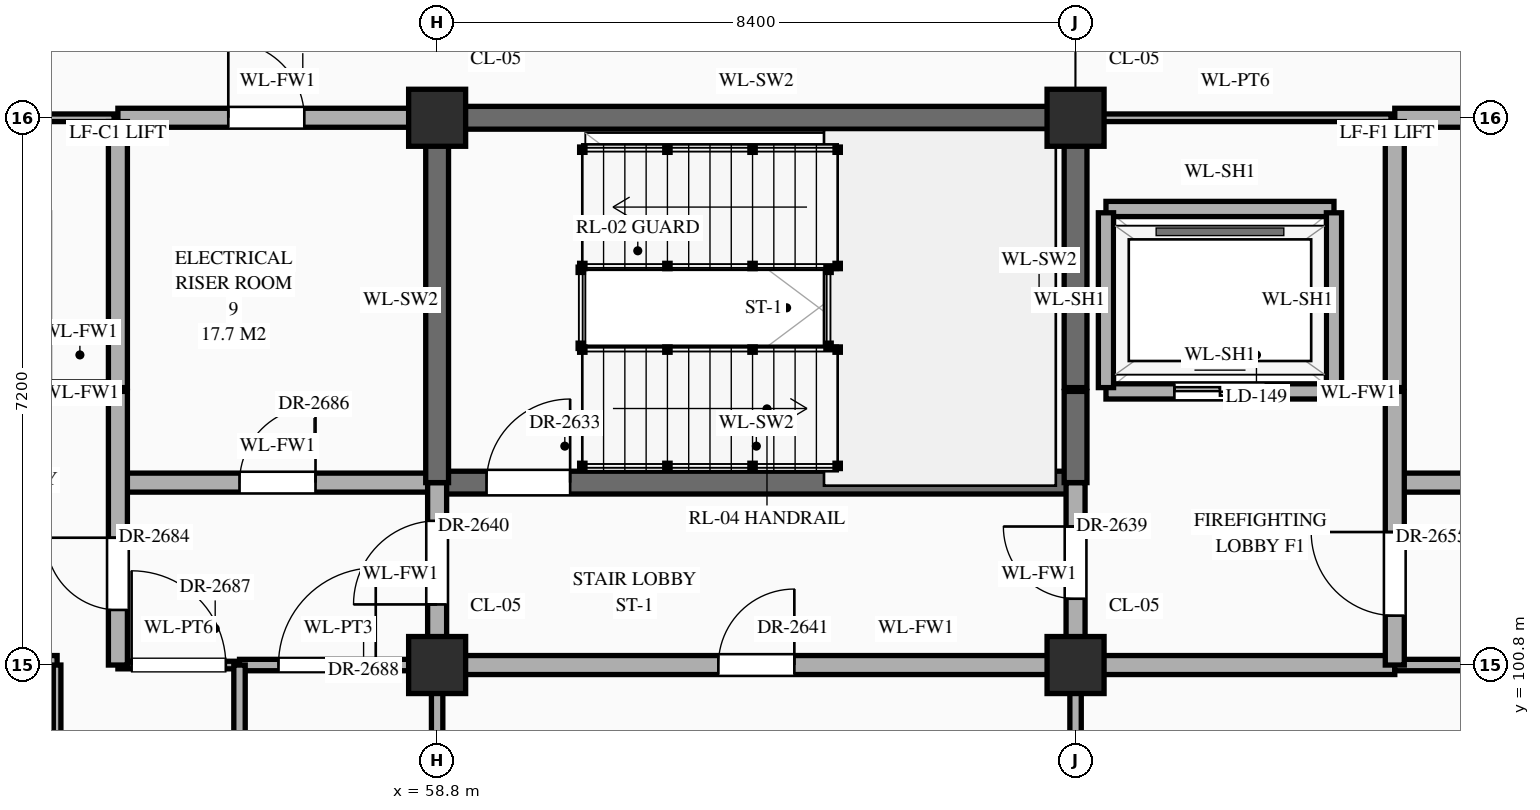
"""IFC4 building model, lengths in metres.
Left out: names, types, materials, properties, quantities, classifications, styles, units other than length and angle.
Written with IfcOpenShell. Run it as: python <this file> out.ifc"""

import sys

from ifc_helpers import new_model, si_unit, direction, frame, frame_2d, origin, origin_2d, place, context, subcontext, project, spatial, rectangle, extrude, element, fill, save


model = new_model("IFC4")
c1 = context("Model", 3, precision=1e-05, world=origin(), true_north=direction((0.0, 1.0)))
c2 = subcontext(c1, "Body", "Model", "MODEL_VIEW")
j1 = project(units=[si_unit("LENGTHUNIT", "METRE"), si_unit("PLANEANGLEUNIT", "RADIAN")], contexts=[c1])
p1 = place(None, origin())
s1 = spatial("IfcSite", under=j1, at=p1, CompositionType="ELEMENT")
p2 = place(p1, origin())
s2 = spatial("IfcBuilding", under=s1, at=p2, CompositionType="ELEMENT")
p3 = place(p2, frame((0.0, 0.0, 39.3)))
s3 = spatial("IfcBuildingStorey", under=s2, at=p3, CompositionType="ELEMENT", Elevation=39.3)
for number, where, z_axis, x_axis in (
    (1, (58.8, 100.8, 0.0), (0.0, 0.0, 1.0), (1.0, 0.0, 0.0)),
    (2, (58.8, 108.0, 0.0), (0.0, 0.0, 1.0), (1.0, 0.0, 0.0)),
    (3, (67.2, 100.8, 0.0), (0.0, 0.0, 1.0), (1.0, 0.0, 0.0)),
    (4, (67.2, 108.0, 0.0), (0.0, 0.0, 1.0), (1.0, 0.0, 0.0)),
):
    element("IfcColumn", number, at=place(p3, frame(where, z_axis=z_axis, x_axis=x_axis)), inside=s3, PredefinedType="COLUMN", context=c2, shape_type="SweptSolid", body=[
        extrude(rectangle(XDim=0.75, YDim=0.75, at=origin_2d()), origin(), (0.0, 0.0, 1.0), 4.2),
    ])
p4 = place(p3, frame((50.4, 100.8, 0.0), z_axis=(0.0, 0.0, 1.0), x_axis=(1.0, 0.0, 0.0)))
e5 = element("IfcWall", 5, at=p4, inside=s3, PredefinedType="STANDARD", context=c2, shape_type="SweptSolid", body=[
    extrude(rectangle(XDim=3.4, YDim=0.25, at=frame_2d((1.7, 0.0))), origin(), (0.0, 0.0, 1.0), 3.1),
])
p5 = place(p4, frame((1.298, 0.0, 0.0)))
e6 = element("IfcOpeningElement", 6, at=p5, cuts=e5, PredefinedType="OPENING", context=c2, shape_type="SweptSolid", body=[
    extrude(rectangle(XDim=1.1, YDim=2.2, at=frame_2d((0.55, 1.1))), frame((0.0, 0.137, 0.0), z_axis=(0.0, -1.0, 0.0), x_axis=(1.0, 0.0, 0.0)), (0.0, 0.0, 1.0), 0.274),
])
p6 = place(p3, frame((54.6, 100.8, 0.0), z_axis=(0.0, 0.0, 1.0), x_axis=(1.0, 0.0, 0.0)))
e7 = element("IfcWall", 7, at=p6, inside=s3, PredefinedType="STANDARD", context=c2, shape_type="SweptSolid", body=[
    extrude(rectangle(XDim=1.6, YDim=0.1, at=frame_2d((0.8, 0.0))), origin(), (0.0, 0.0, 1.0), 3.1),
])
p7 = place(p6, frame((0.18, 0.0, 0.0)))
e8 = element("IfcOpeningElement", 8, at=p7, cuts=e7, PredefinedType="OPENING", context=c2, shape_type="SweptSolid", body=[
    extrude(rectangle(XDim=1.24, YDim=2.3, at=frame_2d((0.62, 1.15))), frame((0.0, 0.062, 0.0), z_axis=(0.0, -1.0, 0.0), x_axis=(1.0, 0.0, 0.0)), (0.0, 0.0, 1.0), 0.124),
])
p8 = place(p3, frame((56.2, 100.8, 0.0), z_axis=(0.0, 0.0, 1.0), x_axis=(1.0, 0.0, 0.0)))
e9 = element("IfcWall", 9, at=p8, inside=s3, PredefinedType="STANDARD", context=c2, shape_type="SweptSolid", body=[
    extrude(rectangle(XDim=2.6, YDim=0.15, at=frame_2d((1.3, 0.0))), origin(), (0.0, 0.0, 1.0), 3.1),
])
p9 = place(p8, frame((0.512, 0.0, 0.0)))
e10 = element("IfcOpeningElement", 10, at=p9, cuts=e9, PredefinedType="OPENING", context=c2, shape_type="SweptSolid", body=[
    extrude(rectangle(XDim=1.28, YDim=2.35, at=frame_2d((0.64, 1.175))), frame((0.0, 0.087, 0.0), z_axis=(0.0, -1.0, 0.0), x_axis=(1.0, 0.0, 0.0)), (0.0, 0.0, 1.0), 0.174),
])
p10 = place(p3, frame((58.8, 100.8, 0.0), z_axis=(0.0, 0.0, 1.0), x_axis=(1.0, 0.0, 0.0)))
e11 = element("IfcWall", 11, at=p10, inside=s3, PredefinedType="STANDARD", context=c2, shape_type="SweptSolid", body=[
    extrude(rectangle(XDim=12.6, YDim=0.25, at=frame_2d((6.3, 0.0))), origin(), (0.0, 0.0, 1.0), 3.1),
])
p11 = place(p10, frame((3.7, 0.0, 0.0)))
e12 = element("IfcOpeningElement", 12, at=p11, cuts=e11, PredefinedType="OPENING", context=c2, shape_type="SweptSolid", body=[
    extrude(rectangle(XDim=1.0, YDim=2.2, at=frame_2d((0.5, 1.1))), frame((0.0, 0.137, 0.0), z_axis=(0.0, -1.0, 0.0), x_axis=(1.0, 0.0, 0.0)), (0.0, 0.0, 1.0), 0.274),
])
p12 = place(p3, frame((71.4, 100.8, 0.0), z_axis=(0.0, 0.0, 1.0), x_axis=(1.0, 0.0, 0.0)))
e13 = element("IfcWall", 13, at=p12, inside=s3, PredefinedType="STANDARD", context=c2, shape_type="SweptSolid", body=[
    extrude(rectangle(XDim=4.2, YDim=0.15, at=frame_2d((2.1, 0.0))), origin(), (0.0, 0.0, 1.0), 3.1),
])
p13 = place(p12, frame((1.423, 0.0, 0.0)))
e14 = element("IfcOpeningElement", 14, at=p13, cuts=e13, PredefinedType="OPENING", context=c2, shape_type="SweptSolid", body=[
    extrude(rectangle(XDim=1.06, YDim=2.4, at=frame_2d((0.53, 1.2))), frame((0.0, 0.087, 0.0), z_axis=(0.0, -1.0, 0.0), x_axis=(1.0, 0.0, 0.0)), (0.0, 0.0, 1.0), 0.174),
])
p14 = place(p3, frame((54.6, 103.2, 0.0), z_axis=(0.0, 0.0, 1.0), x_axis=(1.0, 0.0, 0.0)))
e15 = element("IfcWall", 15, at=p14, inside=s3, PredefinedType="STANDARD", context=c2, shape_type="SweptSolid", body=[
    extrude(rectangle(XDim=4.2, YDim=0.25, at=frame_2d((2.1, 0.0))), origin(), (0.0, 0.0, 1.0), 3.95),
])
p15 = place(p14, frame((1.6, 0.0, 0.0)))
e16 = element("IfcOpeningElement", 16, at=p15, cuts=e15, PredefinedType="OPENING", context=c2, shape_type="SweptSolid", body=[
    extrude(rectangle(XDim=1.0, YDim=2.2, at=frame_2d((0.5, 1.1))), frame((0.0, 0.137, 0.0), z_axis=(0.0, -1.0, 0.0), x_axis=(1.0, 0.0, 0.0)), (0.0, 0.0, 1.0), 0.274),
])
p16 = place(p3, frame((58.8, 103.2, 0.0), z_axis=(0.0, 0.0, 1.0), x_axis=(1.0, 0.0, 0.0)))
e17 = element("IfcWall", 17, at=p16, inside=s3, PredefinedType="SHEAR", context=c2, shape_type="SweptSolid", body=[
    extrude(rectangle(XDim=8.4, YDim=0.3, at=frame_2d((4.2, 0.0))), origin(), (0.0, 0.0, 1.0), 3.95),
])
p17 = place(p16, frame((0.65, 0.0, 0.0)))
e18 = element("IfcOpeningElement", 18, at=p17, cuts=e17, PredefinedType="OPENING", context=c2, shape_type="SweptSolid", body=[
    extrude(rectangle(XDim=1.1, YDim=2.2, at=frame_2d((0.55, 1.1))), frame((0.0, 0.162, 0.0), z_axis=(0.0, -1.0, 0.0), x_axis=(1.0, 0.0, 0.0)), (0.0, 0.0, 1.0), 0.324),
])
p18 = place(p3, frame((71.4, 103.2, 0.0), z_axis=(0.0, 0.0, 1.0), x_axis=(1.0, 0.0, 0.0)))
e19 = element("IfcWall", 19, at=p18, inside=s3, PredefinedType="STANDARD", context=c2, shape_type="SweptSolid", body=[
    extrude(rectangle(XDim=4.2, YDim=0.25, at=frame_2d((2.1, 0.0))), origin(), (0.0, 0.0, 1.0), 3.95),
])
p19 = place(p18, frame((1.6, 0.0, 0.0)))
e20 = element("IfcOpeningElement", 20, at=p19, cuts=e19, PredefinedType="OPENING", context=c2, shape_type="SweptSolid", body=[
    extrude(rectangle(XDim=1.0, YDim=2.2, at=frame_2d((0.5, 1.1))), frame((0.0, 0.137, 0.0), z_axis=(0.0, -1.0, 0.0), x_axis=(1.0, 0.0, 0.0)), (0.0, 0.0, 1.0), 0.274),
])
p20 = place(p3, frame((53.65, 104.4, 0.0), z_axis=(0.0, 0.0, 1.0), x_axis=(1.0, 0.0, 0.0)))
e21 = element("IfcWall", 21, at=p20, inside=s3, PredefinedType="STANDARD", context=c2, shape_type="SweptSolid", body=[
    extrude(rectangle(XDim=0.9, YDim=0.25, at=frame_2d((0.45, 0.0))), origin(), (0.0, 0.0, 1.0), 3.95),
])
p21 = place(p3, frame((67.6, 104.4, 0.0), z_axis=(0.0, 0.0, 1.0), x_axis=(1.0, 0.0, 0.0)))
e22 = element("IfcWall", 22, at=p21, inside=s3, PredefinedType="STANDARD", context=c2, shape_type="SweptSolid", body=[
    extrude(rectangle(XDim=3.0, YDim=0.2, at=frame_2d((1.5, 0.0))), origin(), (0.0, 0.0, 1.0), 3.95),
])
p22 = place(p21, frame((0.9, 0.0, 0.0)))
e23 = element("IfcOpeningElement", 23, at=p22, cuts=e22, PredefinedType="OPENING", context=c2, shape_type="SweptSolid", body=[
    extrude(rectangle(XDim=1.2, YDim=2.15, at=frame_2d((0.6, 1.075))), frame((0.0, 0.112, 0.0), z_axis=(0.0, -1.0, 0.0), x_axis=(1.0, 0.0, 0.0)), (0.0, 0.0, 1.0), 0.224),
])
p23 = place(p3, frame((67.6, 106.8, 0.0), z_axis=(0.0, 0.0, 1.0), x_axis=(1.0, 0.0, 0.0)))
e24 = element("IfcWall", 24, at=p23, inside=s3, PredefinedType="STANDARD", context=c2, shape_type="SweptSolid", body=[
    extrude(rectangle(XDim=3.0, YDim=0.2, at=frame_2d((1.5, 0.0))), origin(), (0.0, 0.0, 1.0), 3.95),
])
p24 = place(p3, frame((50.45, 108.0, 0.0), z_axis=(0.0, 0.0, 1.0), x_axis=(1.0, 0.0, 0.0)))
e25 = element("IfcWall", 25, at=p24, inside=s3, PredefinedType="STANDARD", context=c2, shape_type="SweptSolid", body=[
    extrude(rectangle(XDim=4.1, YDim=0.1, at=frame_2d((2.05, 0.0))), origin(), (0.0, 0.0, 1.0), 3.1),
])
p25 = place(p3, frame((54.6, 108.0, 0.0), z_axis=(0.0, 0.0, 1.0), x_axis=(1.0, 0.0, 0.0)))
e26 = element("IfcWall", 26, at=p25, inside=s3, PredefinedType="STANDARD", context=c2, shape_type="SweptSolid", body=[
    extrude(rectangle(XDim=4.2, YDim=0.25, at=frame_2d((2.1, 0.0))), origin(), (0.0, 0.0, 1.0), 3.1),
])
p26 = place(p25, frame((1.452, 0.0, 0.0)))
e27 = element("IfcOpeningElement", 27, at=p26, cuts=e26, PredefinedType="OPENING", context=c2, shape_type="SweptSolid", body=[
    extrude(rectangle(XDim=1.0, YDim=2.2, at=frame_2d((0.5, 1.1))), frame((0.0, 0.137, 0.0), z_axis=(0.0, -1.0, 0.0), x_axis=(1.0, 0.0, 0.0)), (0.0, 0.0, 1.0), 0.274),
])
p27 = place(p3, frame((58.8, 108.0, 0.0), z_axis=(0.0, 0.0, 1.0), x_axis=(1.0, 0.0, 0.0)))
e28 = element("IfcWall", 28, at=p27, inside=s3, PredefinedType="SHEAR", context=c2, shape_type="SweptSolid", body=[
    extrude(rectangle(XDim=8.4, YDim=0.3, at=frame_2d((4.2, 0.0))), origin(), (0.0, 0.0, 1.0), 3.95),
])
p28 = place(p3, frame((67.25, 108.0, 0.0), z_axis=(0.0, 0.0, 1.0), x_axis=(1.0, 0.0, 0.0)))
e29 = element("IfcWall", 29, at=p28, inside=s3, PredefinedType="STANDARD", context=c2, shape_type="SweptSolid", body=[
    extrude(rectangle(XDim=4.1, YDim=0.1, at=frame_2d((2.05, 0.0))), origin(), (0.0, 0.0, 1.0), 3.1),
])
p29 = place(p3, frame((71.4, 108.0, 0.0), z_axis=(0.0, 0.0, 1.0), x_axis=(1.0, 0.0, 0.0)))
e30 = element("IfcWall", 30, at=p29, inside=s3, PredefinedType="STANDARD", context=c2, shape_type="SweptSolid", body=[
    extrude(rectangle(XDim=4.2, YDim=0.25, at=frame_2d((2.1, 0.0))), origin(), (0.0, 0.0, 1.0), 3.1),
])
p30 = place(p29, frame((1.452, 0.0, 0.0)))
e31 = element("IfcOpeningElement", 31, at=p30, cuts=e30, PredefinedType="OPENING", context=c2, shape_type="SweptSolid", body=[
    extrude(rectangle(XDim=1.0, YDim=2.2, at=frame_2d((0.5, 1.1))), frame((0.0, 0.137, 0.0), z_axis=(0.0, -1.0, 0.0), x_axis=(1.0, 0.0, 0.0)), (0.0, 0.0, 1.0), 0.274),
])
p31 = place(p3, frame((53.8, 96.0, 0.0), z_axis=(0.0, 0.0, 1.0), x_axis=(0.0, 1.0, 0.0)))
e32 = element("IfcWall", 32, at=p31, inside=s3, PredefinedType="STANDARD", context=c2, shape_type="SweptSolid", body=[
    extrude(rectangle(XDim=4.8, YDim=0.1, at=frame_2d((2.4, 0.0))), origin(), (0.0, 0.0, 1.0), 3.95),
])
p32 = place(p31, frame((1.97, 0.0, 0.0)))
e33 = element("IfcOpeningElement", 33, at=p32, cuts=e32, PredefinedType="OPENING", context=c2, shape_type="SweptSolid", body=[
    extrude(rectangle(XDim=0.86, YDim=2.1, at=frame_2d((0.43, 1.05))), frame((0.0, 0.062, 0.0), z_axis=(0.0, -1.0, 0.0), x_axis=(1.0, 0.0, 0.0)), (0.0, 0.0, 1.0), 0.124),
])
p33 = place(p3, frame((54.6, 100.8, 0.0), z_axis=(0.0, 0.0, 1.0), x_axis=(0.0, 1.0, 0.0)))
e34 = element("IfcWall", 34, at=p33, inside=s3, PredefinedType="STANDARD", context=c2, shape_type="SweptSolid", body=[
    extrude(rectangle(XDim=3.6, YDim=0.25, at=frame_2d((1.8, 0.0))), origin(), (0.0, 0.0, 1.0), 3.65),
])
p34 = place(p33, frame((0.725, 0.0, 0.0)))
e35 = element("IfcOpeningElement", 35, at=p34, cuts=e34, PredefinedType="OPENING", context=c2, shape_type="SweptSolid", body=[
    extrude(rectangle(XDim=0.95, YDim=2.15, at=frame_2d((0.475, 1.075))), frame((0.0, 0.137, 0.0), z_axis=(0.0, -1.0, 0.0), x_axis=(1.0, 0.0, 0.0)), (0.0, 0.0, 1.0), 0.274),
])
p35 = place(p3, frame((54.6, 104.45, 0.0), z_axis=(0.0, 0.0, 1.0), x_axis=(0.0, 1.0, 0.0)))
e36 = element("IfcWall", 36, at=p35, inside=s3, PredefinedType="STANDARD", context=c2, shape_type="SweptSolid", body=[
    extrude(rectangle(XDim=3.5, YDim=0.25, at=frame_2d((1.75, 0.0))), origin(), (0.0, 0.0, 1.0), 3.65),
])
p36 = place(p3, frame((56.2, 96.0, 0.0), z_axis=(0.0, 0.0, 1.0), x_axis=(0.0, 1.0, 0.0)))
e37 = element("IfcWall", 37, at=p36, inside=s3, PredefinedType="STANDARD", context=c2, shape_type="SweptSolid", body=[
    extrude(rectangle(XDim=4.8, YDim=0.15, at=frame_2d((2.4, 0.0))), origin(), (0.0, 0.0, 1.0), 3.95),
])
p37 = place(p36, frame((1.94, 0.0, 0.0)))
e38 = element("IfcOpeningElement", 38, at=p37, cuts=e37, PredefinedType="OPENING", context=c2, shape_type="SweptSolid", body=[
    extrude(rectangle(XDim=0.92, YDim=2.15, at=frame_2d((0.46, 1.075))), frame((0.0, 0.087, 0.0), z_axis=(0.0, -1.0, 0.0), x_axis=(1.0, 0.0, 0.0)), (0.0, 0.0, 1.0), 0.174),
])
p38 = place(p3, frame((58.8, 96.0, 0.0), z_axis=(0.0, 0.0, 1.0), x_axis=(0.0, 1.0, 0.0)))
e39 = element("IfcWall", 39, at=p38, inside=s3, PredefinedType="STANDARD", context=c2, shape_type="SweptSolid", body=[
    extrude(rectangle(XDim=4.8, YDim=0.15, at=frame_2d((2.4, 0.0))), origin(), (0.0, 0.0, 1.0), 3.2),
])
p39 = place(p3, frame((58.8, 100.8, 0.0), z_axis=(0.0, 0.0, 1.0), x_axis=(0.0, 1.0, 0.0)))
e40 = element("IfcWall", 40, at=p39, inside=s3, PredefinedType="STANDARD", context=c2, shape_type="SweptSolid", body=[
    extrude(rectangle(XDim=2.4, YDim=0.25, at=frame_2d((1.2, 0.0))), origin(), (0.0, 0.0, 1.0), 3.2),
])
p40 = place(p39, frame((0.798, 0.0, 0.0)))
e41 = element("IfcOpeningElement", 41, at=p40, cuts=e40, PredefinedType="OPENING", context=c2, shape_type="SweptSolid", body=[
    extrude(rectangle(XDim=1.1, YDim=2.2, at=frame_2d((0.55, 1.1))), frame((0.0, 0.137, 0.0), z_axis=(0.0, -1.0, 0.0), x_axis=(1.0, 0.0, 0.0)), (0.0, 0.0, 1.0), 0.274),
])
p41 = place(p3, frame((58.8, 103.2, 0.0), z_axis=(0.0, 0.0, 1.0), x_axis=(0.0, 1.0, 0.0)))
e42 = element("IfcWall", 42, at=p41, inside=s3, PredefinedType="SHEAR", context=c2, shape_type="SweptSolid", body=[
    extrude(rectangle(XDim=4.8, YDim=0.3, at=frame_2d((2.4, 0.0))), origin(), (0.0, 0.0, 1.0), 3.95),
])
p42 = place(p3, frame((67.2, 96.0, 0.0), z_axis=(0.0, 0.0, 1.0), x_axis=(0.0, 1.0, 0.0)))
e43 = element("IfcWall", 43, at=p42, inside=s3, PredefinedType="STANDARD", context=c2, shape_type="SweptSolid", body=[
    extrude(rectangle(XDim=4.8, YDim=0.15, at=frame_2d((2.4, 0.0))), origin(), (0.0, 0.0, 1.0), 3.2),
])
p43 = place(p3, frame((67.2, 100.8, 0.0), z_axis=(0.0, 0.0, 1.0), x_axis=(0.0, 1.0, 0.0)))
e44 = element("IfcWall", 44, at=p43, inside=s3, PredefinedType="STANDARD", context=c2, shape_type="SweptSolid", body=[
    extrude(rectangle(XDim=2.4, YDim=0.25, at=frame_2d((1.2, 0.0))), origin(), (0.0, 0.0, 1.0), 3.2),
])
p44 = place(p43, frame((0.873, 0.0, 0.0)))
e45 = element("IfcOpeningElement", 45, at=p44, cuts=e44, PredefinedType="OPENING", context=c2, shape_type="SweptSolid", body=[
    extrude(rectangle(XDim=0.95, YDim=2.15, at=frame_2d((0.475, 1.075))), frame((0.0, 0.137, 0.0), z_axis=(0.0, -1.0, 0.0), x_axis=(1.0, 0.0, 0.0)), (0.0, 0.0, 1.0), 0.274),
])
p45 = place(p3, frame((67.2, 103.2, 0.0), z_axis=(0.0, 0.0, 1.0), x_axis=(0.0, 1.0, 0.0)))
e46 = element("IfcWall", 46, at=p45, inside=s3, PredefinedType="SHEAR", context=c2, shape_type="SweptSolid", body=[
    extrude(rectangle(XDim=1.2, YDim=0.3, at=frame_2d((0.6, 0.0))), origin(), (0.0, 0.0, 1.0), 3.95),
])
p46 = place(p3, frame((67.2, 104.45, 0.0), z_axis=(0.0, 0.0, 1.0), x_axis=(0.0, 1.0, 0.0)))
e47 = element("IfcWall", 47, at=p46, inside=s3, PredefinedType="SHEAR", context=c2, shape_type="SweptSolid", body=[
    extrude(rectangle(XDim=3.5, YDim=0.3, at=frame_2d((1.75, 0.0))), origin(), (0.0, 0.0, 1.0), 3.95),
])
for number, where, z_axis, x_axis in (
    (48, (67.6, 104.45, 0.0), (0.0, 0.0, 1.0), (0.0, 1.0, 0.0)),
    (49, (70.6, 104.45, 0.0), (0.0, 0.0, 1.0), (0.0, 1.0, 0.0)),
):
    element("IfcWall", number, at=place(p3, frame(where, z_axis=z_axis, x_axis=x_axis)), inside=s3, PredefinedType="STANDARD", context=c2, shape_type="SweptSolid", body=[
        extrude(rectangle(XDim=2.3, YDim=0.2, at=frame_2d((1.15, 0.0))), origin(), (0.0, 0.0, 1.0), 3.95),
    ])
p47 = place(p3, frame((71.4, 100.8, 0.0), z_axis=(0.0, 0.0, 1.0), x_axis=(0.0, 1.0, 0.0)))
e50 = element("IfcWall", 50, at=p47, inside=s3, PredefinedType="STANDARD", context=c2, shape_type="SweptSolid", body=[
    extrude(rectangle(XDim=3.6, YDim=0.25, at=frame_2d((1.8, 0.0))), origin(), (0.0, 0.0, 1.0), 3.6),
])
p48 = place(p47, frame((0.65, 0.0, 0.0)))
e51 = element("IfcOpeningElement", 51, at=p48, cuts=e50, PredefinedType="OPENING", context=c2, shape_type="SweptSolid", body=[
    extrude(rectangle(XDim=1.1, YDim=2.2, at=frame_2d((0.55, 1.1))), frame((0.0, 0.137, 0.0), z_axis=(0.0, -1.0, 0.0), x_axis=(1.0, 0.0, 0.0)), (0.0, 0.0, 1.0), 0.274),
])
p49 = place(p3, frame((71.4, 104.45, 0.0), z_axis=(0.0, 0.0, 1.0), x_axis=(0.0, 1.0, 0.0)))
e52 = element("IfcWall", 52, at=p49, inside=s3, PredefinedType="STANDARD", context=c2, shape_type="SweptSolid", body=[
    extrude(rectangle(XDim=3.5, YDim=0.25, at=frame_2d((1.75, 0.0))), origin(), (0.0, 0.0, 1.0), 3.6),
])
p50 = place(p22, origin())
e53 = element("IfcDoor", 53, at=p50, inside=s3, OperationType="DOUBLE_DOOR_SLIDING", PredefinedType="DOOR", context=c2, shape_type="SweptSolid", body=[
    extrude(rectangle(XDim=1.2, YDim=2.15, at=frame_2d((0.6, 1.075))), frame((0.0, 0.025, 0.0), z_axis=(0.0, -1.0, 0.0), x_axis=(1.0, 0.0, 0.0)), (0.0, 0.0, 1.0), 0.05),
])
fill(e23, e53)
p51 = place(p17, origin())
e54 = element("IfcDoor", 54, at=p51, inside=s3, OperationType="SINGLE_SWING_RIGHT", PredefinedType="DOOR", context=c2, shape_type="SweptSolid", body=[
    extrude(rectangle(XDim=1.1, YDim=2.2, at=frame_2d((0.55, 1.1))), frame((0.0, 0.025, 0.0), z_axis=(0.0, -1.0, 0.0), x_axis=(1.0, 0.0, 0.0)), (0.0, 0.0, 1.0), 0.05),
])
fill(e18, e54)
p52 = place(p44, origin())
e55 = element("IfcDoor", 55, at=p52, inside=s3, OperationType="SINGLE_SWING_RIGHT", PredefinedType="DOOR", context=c2, shape_type="SweptSolid", body=[
    extrude(rectangle(XDim=0.95, YDim=2.15, at=frame_2d((0.475, 1.075))), frame((0.0, 0.025, 0.0), z_axis=(0.0, -1.0, 0.0), x_axis=(1.0, 0.0, 0.0)), (0.0, 0.0, 1.0), 0.05),
])
fill(e45, e55)
p53 = place(p40, origin())
e56 = element("IfcDoor", 56, at=p53, inside=s3, OperationType="SINGLE_SWING_LEFT", PredefinedType="DOOR", context=c2, shape_type="SweptSolid", body=[
    extrude(rectangle(XDim=1.1, YDim=2.2, at=frame_2d((0.55, 1.1))), frame((0.0, 0.025, 0.0), z_axis=(0.0, -1.0, 0.0), x_axis=(1.0, 0.0, 0.0)), (0.0, 0.0, 1.0), 0.05),
])
fill(e41, e56)
p54 = place(p11, origin())
e57 = element("IfcDoor", 57, at=p54, inside=s3, OperationType="SINGLE_SWING_RIGHT", PredefinedType="DOOR", context=c2, shape_type="SweptSolid", body=[
    extrude(rectangle(XDim=1.0, YDim=2.2, at=frame_2d((0.5, 1.1))), frame((0.0, 0.025, 0.0), z_axis=(0.0, -1.0, 0.0), x_axis=(1.0, 0.0, 0.0)), (0.0, 0.0, 1.0), 0.05),
])
fill(e12, e57)
p55 = place(p48, origin())
e58 = element("IfcDoor", 58, at=p55, inside=s3, OperationType="SINGLE_SWING_RIGHT", PredefinedType="DOOR", context=c2, shape_type="SweptSolid", body=[
    extrude(rectangle(XDim=1.1, YDim=2.2, at=frame_2d((0.55, 1.1))), frame((0.0, 0.025, 0.0), z_axis=(0.0, -1.0, 0.0), x_axis=(1.0, 0.0, 0.0)), (0.0, 0.0, 1.0), 0.05),
])
fill(e51, e58)
p56 = place(p34, origin())
e59 = element("IfcDoor", 59, at=p56, inside=s3, OperationType="SINGLE_SWING_RIGHT", PredefinedType="DOOR", context=c2, shape_type="SweptSolid", body=[
    extrude(rectangle(XDim=0.95, YDim=2.15, at=frame_2d((0.475, 1.075))), frame((0.0, 0.025, 0.0), z_axis=(0.0, -1.0, 0.0), x_axis=(1.0, 0.0, 0.0)), (0.0, 0.0, 1.0), 0.05),
])
fill(e35, e59)
p57 = place(p15, origin())
e60 = element("IfcDoor", 60, at=p57, inside=s3, OperationType="SINGLE_SWING_RIGHT", PredefinedType="DOOR", context=c2, shape_type="SweptSolid", body=[
    extrude(rectangle(XDim=1.0, YDim=2.2, at=frame_2d((0.5, 1.1))), frame((0.0, 0.025, 0.0), z_axis=(0.0, -1.0, 0.0), x_axis=(1.0, 0.0, 0.0)), (0.0, 0.0, 1.0), 0.05),
])
fill(e16, e60)
p58 = place(p7, origin())
e61 = element("IfcDoor", 61, at=p58, inside=s3, OperationType="SINGLE_SWING_LEFT", PredefinedType="DOOR", context=c2, shape_type="SweptSolid", body=[
    extrude(rectangle(XDim=1.24, YDim=2.3, at=frame_2d((0.62, 1.15))), frame((0.0, 0.025, 0.0), z_axis=(0.0, -1.0, 0.0), x_axis=(1.0, 0.0, 0.0)), (0.0, 0.0, 1.0), 0.05),
])
fill(e8, e61)
p59 = place(p9, origin())
e62 = element("IfcDoor", 62, at=p59, inside=s3, OperationType="SINGLE_SWING_RIGHT", PredefinedType="DOOR", context=c2, shape_type="SweptSolid", body=[
    extrude(rectangle(XDim=1.28, YDim=2.35, at=frame_2d((0.64, 1.175))), frame((0.0, 0.025, 0.0), z_axis=(0.0, -1.0, 0.0), x_axis=(1.0, 0.0, 0.0)), (0.0, 0.0, 1.0), 0.05),
])
fill(e10, e62)
p60 = place(p26, origin())
e63 = element("IfcDoor", 63, at=p60, inside=s3, OperationType="SINGLE_SWING_LEFT", PredefinedType="DOOR", context=c2, shape_type="SweptSolid", body=[
    extrude(rectangle(XDim=1.0, YDim=2.2, at=frame_2d((0.5, 1.1))), frame((0.0, 0.025, 0.0), z_axis=(0.0, -1.0, 0.0), x_axis=(1.0, 0.0, 0.0)), (0.0, 0.0, 1.0), 0.05),
])
fill(e27, e63)
save(model, sys.argv[1])
